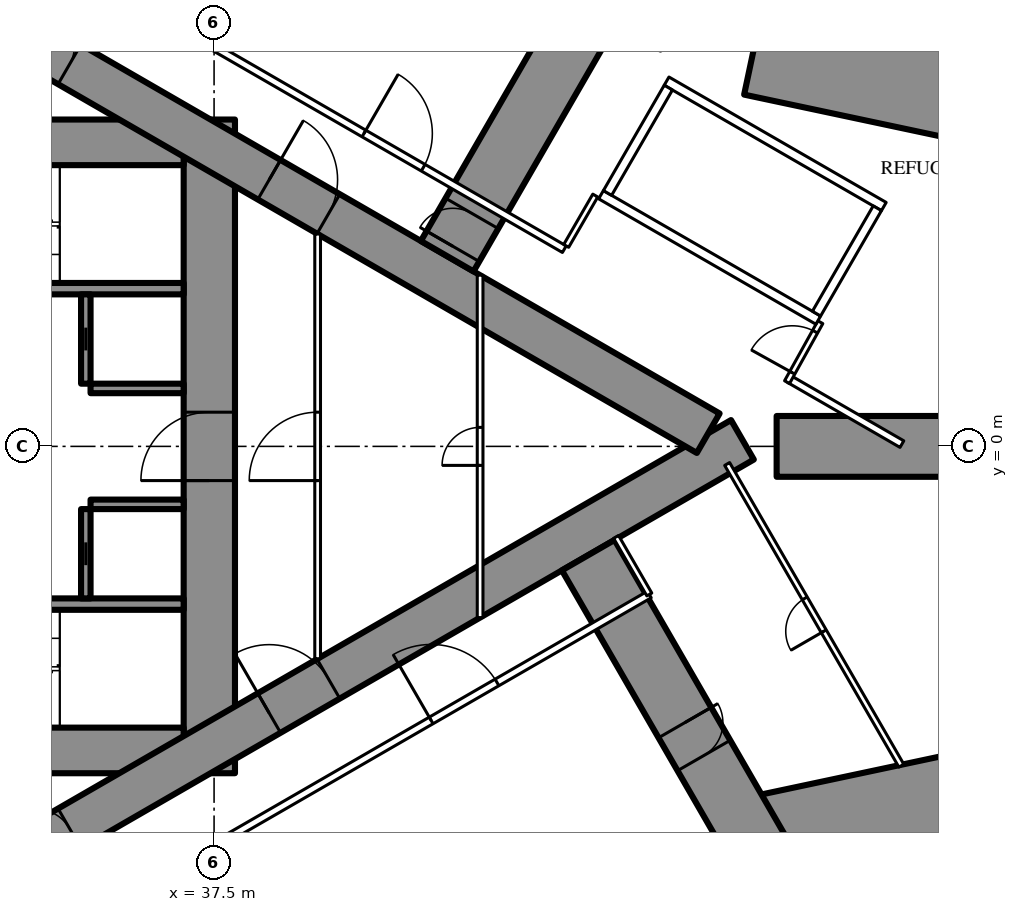
"""IFC4 building model, lengths in metres.
Left out: names, types, materials, properties, quantities, classifications, styles, units other than length and angle.
Written with IfcOpenShell. Run it as: python <this file> out.ifc"""

import sys

from ifc_helpers import new_model, si_unit, direction, frame, frame_2d, origin, place, context, subcontext, project, spatial, rectangle, extrude, element, fill, save


model = new_model("IFC4")
c1 = context("Model", 3, precision=1e-05, world=origin(), true_north=direction((0.0, 1.0)))
c2 = subcontext(c1, "Body", "Model", "MODEL_VIEW")
j1 = project(units=[si_unit("LENGTHUNIT", "METRE"), si_unit("PLANEANGLEUNIT", "RADIAN")], contexts=[c1])
p1 = place(None, origin())
s1 = spatial("IfcSite", under=j1, at=p1, CompositionType="ELEMENT")
p2 = place(p1, origin())
s2 = spatial("IfcBuilding", under=s1, at=p2, CompositionType="ELEMENT")
p3 = place(p2, frame((0.0, 0.0, 205.3)))
s3 = spatial("IfcBuildingStorey", under=s2, at=p3, CompositionType="ELEMENT", Elevation=205.3)
for number, where, z_axis, x_axis in (
    (1, (57.59, 9.381, 0.0), (0.0, 0.0, 1.0), (-0.978, 0.208, 0.0)),
    (2, (57.59, -9.381, 0.0), (0.0, 0.0, 1.0), (-0.978, -0.208, 0.0)),
):
    element("IfcWall", number, at=place(p3, frame(where, z_axis=z_axis, x_axis=x_axis)), inside=s3, PredefinedType="SHEAR", context=c2, shape_type="SweptSolid", body=[
        extrude(rectangle(XDim=5.983, YDim=2.8, at=frame_2d((2.991, 0.0))), origin(), (0.0, 0.0, 1.0), 5.0),
    ])
p4 = place(p3, frame((37.375, -8.6, 0.0), z_axis=(0.0, 0.0, 1.0), x_axis=(0.0, 1.0, 0.0)))
e3 = element("IfcWall", 3, at=p4, inside=s3, PredefinedType="SHEAR", context=c2, shape_type="SweptSolid", body=[
    extrude(rectangle(XDim=17.2, YDim=1.35, at=frame_2d((8.6, 0.0))), origin(), (0.0, 0.0, 1.0), 5.0),
])
p5 = place(p4, frame((7.7, 0.0, 0.0)))
e4 = element("IfcOpeningElement", 4, at=p5, cuts=e3, PredefinedType="OPENING", context=c2, shape_type="SweptSolid", body=[
    extrude(rectangle(XDim=1.8, YDim=2.2, at=frame_2d((0.9, 1.1))), frame((0.0, 0.685, 0.0), z_axis=(0.0, -1.0, 0.0), x_axis=(1.0, 0.0, 0.0)), (0.0, 0.0, 1.0), 1.37),
])
p6 = place(p3, frame((28.3, -8.0, 0.0), z_axis=(0.0, 0.0, 1.0), x_axis=(1.0, 0.0, 0.0)))
e5 = element("IfcWall", 5, at=p6, inside=s3, PredefinedType="SHEAR", context=c2, shape_type="SweptSolid", body=[
    extrude(rectangle(XDim=8.4, YDim=1.2, at=frame_2d((4.2, 0.0))), origin(), (0.0, 0.0, 1.0), 5.0),
])
p7 = place(p6, frame((0.25, 0.0, 0.0)))
e6 = element("IfcOpeningElement", 6, at=p7, cuts=e5, PredefinedType="OPENING", context=c2, shape_type="SweptSolid", body=[
    extrude(rectangle(XDim=1.0, YDim=2.2, at=frame_2d((0.5, 1.1))), frame((0.0, 0.61, 0.0), z_axis=(0.0, -1.0, 0.0), x_axis=(1.0, 0.0, 0.0)), (0.0, 0.0, 1.0), 1.22),
])
p8 = place(p3, frame((28.3, 8.0, 0.0), z_axis=(0.0, 0.0, 1.0), x_axis=(1.0, 0.0, 0.0)))
e7 = element("IfcWall", 7, at=p8, inside=s3, PredefinedType="SHEAR", context=c2, shape_type="SweptSolid", body=[
    extrude(rectangle(XDim=8.4, YDim=1.2, at=frame_2d((4.2, 0.0))), origin(), (0.0, 0.0, 1.0), 5.0),
])
p9 = place(p8, frame((0.25, 0.0, 0.0)))
e8 = element("IfcOpeningElement", 8, at=p9, cuts=e7, PredefinedType="OPENING", context=c2, shape_type="SweptSolid", body=[
    extrude(rectangle(XDim=1.0, YDim=2.2, at=frame_2d((0.5, 1.1))), frame((0.0, 0.61, 0.0), z_axis=(0.0, -1.0, 0.0), x_axis=(1.0, 0.0, 0.0)), (0.0, 0.0, 1.0), 1.22),
])
for number, where, z_axis, x_axis in (
    (9, (28.3, -4.15, 0.0), (0.0, 0.0, 1.0), (1.0, 0.0, 0.0)),
    (10, (28.3, 4.15, 0.0), (0.0, 0.0, 1.0), (1.0, 0.0, 0.0)),
):
    element("IfcWall", number, at=place(p3, frame(where, z_axis=z_axis, x_axis=x_axis)), inside=s3, PredefinedType="SHEAR", context=c2, shape_type="SweptSolid", body=[
        extrude(rectangle(XDim=8.4, YDim=0.3, at=frame_2d((4.2, 0.0))), origin(), (0.0, 0.0, 1.0), 5.0),
    ])
p10 = place(p3, frame((34.125, -4.0, 0.0), z_axis=(0.0, 0.0, 1.0), x_axis=(0.0, 1.0, 0.0)))
e11 = element("IfcWall", 11, at=p10, inside=s3, PredefinedType="SHEAR", context=c2, shape_type="SweptSolid", body=[
    extrude(rectangle(XDim=2.35, YDim=0.25, at=frame_2d((1.175, 0.0))), origin(), (0.0, 0.0, 1.0), 5.0),
])
p11 = place(p10, frame((0.875, 0.0, 0.0)))
e12 = element("IfcOpeningElement", 12, at=p11, cuts=e11, PredefinedType="OPENING", context=c2, shape_type="SweptSolid", body=[
    extrude(rectangle(XDim=0.6, YDim=2.0, at=frame_2d((0.3, 1.0))), frame((0.0, 0.135, 0.0), z_axis=(0.0, -1.0, 0.0), x_axis=(1.0, 0.0, 0.0)), (0.0, 0.0, 1.0), 0.27),
])
p12 = place(p3, frame((34.25, -1.525, 0.0), z_axis=(0.0, 0.0, 1.0), x_axis=(1.0, 0.0, 0.0)))
e13 = element("IfcWall", 13, at=p12, inside=s3, PredefinedType="SHEAR", context=c2, shape_type="SweptSolid", body=[
    extrude(rectangle(XDim=2.45, YDim=0.25, at=frame_2d((1.225, 0.0))), origin(), (0.0, 0.0, 1.0), 5.0),
])
p13 = place(p3, frame((34.125, 1.65, 0.0), z_axis=(0.0, 0.0, 1.0), x_axis=(0.0, 1.0, 0.0)))
e14 = element("IfcWall", 14, at=p13, inside=s3, PredefinedType="SHEAR", context=c2, shape_type="SweptSolid", body=[
    extrude(rectangle(XDim=2.35, YDim=0.25, at=frame_2d((1.175, 0.0))), origin(), (0.0, 0.0, 1.0), 5.0),
])
p14 = place(p13, frame((0.875, 0.0, 0.0)))
e15 = element("IfcOpeningElement", 15, at=p14, cuts=e14, PredefinedType="OPENING", context=c2, shape_type="SweptSolid", body=[
    extrude(rectangle(XDim=0.6, YDim=2.0, at=frame_2d((0.3, 1.0))), frame((0.0, 0.135, 0.0), z_axis=(0.0, -1.0, 0.0), x_axis=(1.0, 0.0, 0.0)), (0.0, 0.0, 1.0), 0.27),
])
p15 = place(p3, frame((34.25, 1.525, 0.0), z_axis=(0.0, 0.0, 1.0), x_axis=(1.0, 0.0, 0.0)))
e16 = element("IfcWall", 16, at=p15, inside=s3, PredefinedType="SHEAR", context=c2, shape_type="SweptSolid", body=[
    extrude(rectangle(XDim=2.45, YDim=0.25, at=frame_2d((1.225, 0.0))), origin(), (0.0, 0.0, 1.0), 5.0),
])
p16 = place(p3, frame((27.2, -13.8, 0.0), z_axis=(0.0, 0.0, 1.0), x_axis=(0.866027159892, 0.499996958321, 0.0)))
e17 = element("IfcWall", 17, at=p16, inside=s3, PredefinedType="SHEAR", context=c2, shape_type="SweptSolid", body=[
    extrude(rectangle(XDim=27.947, YDim=1.2, at=frame_2d((13.973, 0.0))), origin(), (0.0, 0.0, 1.0), 5.0),
])
p17 = place(p16, frame((6.5, 0.0, 0.0)))
e18 = element("IfcOpeningElement", 18, at=p17, cuts=e17, PredefinedType="OPENING", context=c2, shape_type="SweptSolid", body=[
    extrude(rectangle(XDim=1.0, YDim=2.2, at=frame_2d((0.5, 1.1))), frame((0.0, 0.61, 0.0), z_axis=(0.0, -1.0, 0.0), x_axis=(1.0, 0.0, 0.0)), (0.0, 0.0, 1.0), 1.22),
])
p18 = place(p16, frame((13.568, 0.0, 0.0)))
e19 = element("IfcOpeningElement", 19, at=p18, cuts=e17, PredefinedType="OPENING", context=c2, shape_type="SweptSolid", body=[
    extrude(rectangle(XDim=1.8, YDim=2.2, at=frame_2d((0.9, 1.1))), frame((0.0, 0.61, 0.0), z_axis=(0.0, -1.0, 0.0), x_axis=(1.0, 0.0, 0.0)), (0.0, 0.0, 1.0), 1.22),
])
p19 = place(p3, frame((27.2, 13.8, 0.0), z_axis=(0.0, 0.0, 1.0), x_axis=(0.866024515034, -0.500001539357, 0.0)))
e20 = element("IfcWall", 20, at=p19, inside=s3, PredefinedType="SHEAR", context=c2, shape_type="SweptSolid", body=[
    extrude(rectangle(XDim=26.907, YDim=1.2, at=frame_2d((13.454, 0.0))), origin(), (0.0, 0.0, 1.0), 5.0),
])
p20 = place(p19, frame((6.5, 0.0, 0.0)))
e21 = element("IfcOpeningElement", 21, at=p20, cuts=e20, PredefinedType="OPENING", context=c2, shape_type="SweptSolid", body=[
    extrude(rectangle(XDim=1.0, YDim=2.2, at=frame_2d((0.5, 1.1))), frame((0.0, 0.61, 0.0), z_axis=(0.0, -1.0, 0.0), x_axis=(1.0, 0.0, 0.0)), (0.0, 0.0, 1.0), 1.22),
])
p21 = place(p19, frame((13.568, 0.0, 0.0)))
e22 = element("IfcOpeningElement", 22, at=p21, cuts=e20, PredefinedType="OPENING", context=c2, shape_type="SweptSolid", body=[
    extrude(rectangle(XDim=1.8, YDim=2.2, at=frame_2d((0.9, 1.1))), frame((0.0, 0.61, 0.0), z_axis=(0.0, -1.0, 0.0), x_axis=(1.0, 0.0, 0.0)), (0.0, 0.0, 1.0), 1.22),
])
p22 = place(p3, frame((47.345, -2.862, 0.0), z_axis=(0.0, 0.0, 1.0), x_axis=(0.500012973899, -0.866017913171, 0.0)))
e23 = element("IfcWall", 23, at=p22, inside=s3, PredefinedType="SHEAR", context=c2, shape_type="SweptSolid", body=[
    extrude(rectangle(XDim=10.499, YDim=1.6, at=frame_2d((5.25, 0.0))), origin(), (0.0, 0.0, 1.0), 5.0),
])
p23 = place(p22, frame((5.087, 0.0, 0.0)))
e24 = element("IfcOpeningElement", 24, at=p23, cuts=e23, PredefinedType="OPENING", context=c2, shape_type="SweptSolid", body=[
    extrude(rectangle(XDim=1.0, YDim=2.2, at=frame_2d((0.5, 1.1))), frame((0.0, 0.81, 0.0), z_axis=(0.0, -1.0, 0.0), x_axis=(1.0, 0.0, 0.0)), (0.0, 0.0, 1.0), 1.62),
])
p24 = place(p3, frame((52.302, 0.0, 0.0), z_axis=(0.0, 0.0, 1.0), x_axis=(1.0, 0.0, 0.0)))
e25 = element("IfcWall", 25, at=p24, inside=s3, PredefinedType="SHEAR", context=c2, shape_type="SweptSolid", body=[
    extrude(rectangle(XDim=10.239, YDim=1.6, at=frame_2d((5.12, 0.0))), origin(), (0.0, 0.0, 1.0), 5.0),
])
p25 = place(p3, frame((43.634, 5.004, 0.0), z_axis=(0.0, 0.0, 1.0), x_axis=(0.499995493849, 0.866028005396, 0.0)))
e26 = element("IfcWall", 26, at=p25, inside=s3, PredefinedType="SHEAR", context=c2, shape_type="SweptSolid", body=[
    extrude(rectangle(XDim=10.526, YDim=1.6, at=frame_2d((5.263, 0.0))), origin(), (0.0, 0.0, 1.0), 5.0),
])
p26 = place(p25, frame((0.3, 0.0, 0.0)))
e27 = element("IfcOpeningElement", 27, at=p26, cuts=e26, PredefinedType="OPENING", context=c2, shape_type="SweptSolid", body=[
    extrude(rectangle(XDim=1.0, YDim=2.2, at=frame_2d((0.5, 1.1))), frame((0.0, 0.81, 0.0), z_axis=(0.0, -1.0, 0.0), x_axis=(1.0, 0.0, 0.0)), (0.0, 0.0, 1.0), 1.62),
])
p27 = place(p3, frame((55.583, -8.401, 0.0), z_axis=(0.0, 0.0, 1.0), x_axis=(-0.499997575924, 0.866026803321, 0.0)))
e28 = element("IfcWall", 28, at=p27, inside=s3, PredefinedType="PARTITIONING", context=c2, shape_type="SweptSolid", body=[
    extrude(rectangle(XDim=9.167, YDim=0.15, at=frame_2d((4.583, 0.0))), origin(), (0.0, 0.0, 1.0), 4.75),
])
p28 = place(p27, frame((4.083, 0.0, 0.0)))
e29 = element("IfcOpeningElement", 29, at=p28, cuts=e28, PredefinedType="OPENING", context=c2, shape_type="SweptSolid", body=[
    extrude(rectangle(XDim=1.0, YDim=2.2, at=frame_2d((0.5, 1.1))), frame((0.0, 0.085, 0.0), z_axis=(0.0, -1.0, 0.0), x_axis=(1.0, 0.0, 0.0)), (0.0, 0.0, 1.0), 0.17),
])
p29 = place(p3, frame((27.959, 16.017, 0.0), z_axis=(0.0, 0.0, 1.0), x_axis=(0.866027146794, -0.499996981007, 0.0)))
e30 = element("IfcWall", 30, at=p29, inside=s3, PredefinedType="PARTITIONING", context=c2, shape_type="SweptSolid", body=[
    extrude(rectangle(XDim=21.657, YDim=0.2, at=frame_2d((10.829, 0.0))), origin(), (0.0, 0.0, 1.0), 4.75),
])
p30 = place(p29, frame((15.57, 0.0, 0.0)))
e31 = element("IfcOpeningElement", 31, at=p30, cuts=e30, PredefinedType="OPENING", context=c2, shape_type="SweptSolid", body=[
    extrude(rectangle(XDim=1.8, YDim=2.2, at=frame_2d((0.9, 1.1))), frame((0.0, 0.11, 0.0), z_axis=(0.0, -1.0, 0.0), x_axis=(1.0, 0.0, 0.0)), (0.0, 0.0, 1.0), 0.22),
])
p31 = place(p29, frame((6.579, 0.0, 0.0)))
e32 = element("IfcOpeningElement", 32, at=p31, cuts=e30, PredefinedType="OPENING", context=c2, shape_type="SweptSolid", body=[
    extrude(rectangle(XDim=1.8, YDim=2.2, at=frame_2d((0.9, 1.1))), frame((0.0, 0.11, 0.0), z_axis=(0.0, -1.0, 0.0), x_axis=(1.0, 0.0, 0.0)), (0.0, 0.0, 1.0), 0.22),
])
p32 = place(p3, frame((52.639, 1.769, 0.0), z_axis=(0.0, 0.0, 1.0), x_axis=(0.866027340901, -0.4999966448, 0.0)))
e33 = element("IfcWall", 33, at=p32, inside=s3, PredefinedType="PARTITIONING", context=c2, shape_type="SweptSolid", body=[
    extrude(rectangle(XDim=3.417, YDim=0.2, at=frame_2d((1.708, 0.0))), origin(), (0.0, 0.0, 1.0), 4.75),
])
p33 = place(p3, frame((52.576, 1.689, 0.0), z_axis=(0.0, 0.0, 1.0), x_axis=(0.485482130951, 0.874246590229, 0.0)))
e34 = element("IfcWall", 34, at=p33, inside=s3, PredefinedType="PARTITIONING", context=c2, shape_type="SweptSolid", body=[
    extrude(rectangle(XDim=1.805, YDim=0.15, at=frame_2d((0.902, 0.0))), origin(), (0.0, 0.0, 1.0), 4.75),
])
p34 = place(p33, frame((0.285, 0.0, 0.0)))
e35 = element("IfcOpeningElement", 35, at=p34, cuts=e34, PredefinedType="OPENING", context=c2, shape_type="SweptSolid", body=[
    extrude(rectangle(XDim=1.235, YDim=2.2, at=frame_2d((0.618, 1.1))), frame((0.0, 0.085, 0.0), z_axis=(0.0, -1.0, 0.0), x_axis=(1.0, 0.0, 0.0)), (0.0, 0.0, 1.0), 0.17),
])
p35 = place(p3, frame((46.765, 5.275, 0.0), z_axis=(0.0, 0.0, 1.0), x_axis=(0.499915892944, 0.866073957571, 0.0)))
e36 = element("IfcWall", 36, at=p35, inside=s3, PredefinedType="PARTITIONING", context=c2, shape_type="SweptSolid", body=[
    extrude(rectangle(XDim=1.53, YDim=0.15, at=frame_2d((0.765, 0.0))), origin(), (0.0, 0.0, 1.0), 4.75),
])
p36 = place(p3, frame((27.959, -16.017, 0.0), z_axis=(0.0, 0.0, 1.0), x_axis=(0.866026253963, 0.499998527445, 0.0)))
e37 = element("IfcWall", 37, at=p36, inside=s3, PredefinedType="PARTITIONING", context=c2, shape_type="SweptSolid", body=[
    extrude(rectangle(XDim=24.241, YDim=0.2, at=frame_2d((12.12, 0.0))), origin(), (0.0, 0.0, 1.0), 4.75),
])
p37 = place(p36, frame((6.579, 0.0, 0.0)))
e38 = element("IfcOpeningElement", 38, at=p37, cuts=e37, PredefinedType="OPENING", context=c2, shape_type="SweptSolid", body=[
    extrude(rectangle(XDim=1.8, YDim=2.2, at=frame_2d((0.9, 1.1))), frame((0.0, 0.11, 0.0), z_axis=(0.0, -1.0, 0.0), x_axis=(1.0, 0.0, 0.0)), (0.0, 0.0, 1.0), 0.22),
])
p38 = place(p36, frame((17.612, 0.0, 0.0)))
e39 = element("IfcOpeningElement", 39, at=p38, cuts=e37, PredefinedType="OPENING", context=c2, shape_type="SweptSolid", body=[
    extrude(rectangle(XDim=2.0, YDim=2.4, at=frame_2d((1.0, 1.2))), frame((0.0, 0.11, 0.0), z_axis=(0.0, -1.0, 0.0), x_axis=(1.0, 0.0, 0.0)), (0.0, 0.0, 1.0), 0.22),
])
p39 = place(p3, frame((48.953, -3.897, 0.0), z_axis=(0.0, 0.0, 1.0), x_axis=(-0.499980071345, 0.866036909293, 0.0)))
e40 = element("IfcWall", 40, at=p39, inside=s3, PredefinedType="PARTITIONING", context=c2, shape_type="SweptSolid", body=[
    extrude(rectangle(XDim=1.75, YDim=0.15, at=frame_2d((0.875, 0.0))), origin(), (0.0, 0.0, 1.0), 4.75),
])
p40 = place(p3, frame((40.225, -5.587, 0.0), z_axis=(0.0, 0.0, 1.0), x_axis=(0.0, 1.0, 0.0)))
e41 = element("IfcWall", 41, at=p40, inside=s3, PredefinedType="PARTITIONING", context=c2, shape_type="SweptSolid", body=[
    extrude(rectangle(XDim=11.174, YDim=0.15, at=frame_2d((5.587, 0.0))), origin(), (0.0, 0.0, 1.0), 4.75),
])
p41 = place(p40, frame((4.687, 0.0, 0.0)))
e42 = element("IfcOpeningElement", 42, at=p41, cuts=e41, PredefinedType="OPENING", context=c2, shape_type="SweptSolid", body=[
    extrude(rectangle(XDim=1.8, YDim=2.2, at=frame_2d((0.9, 1.1))), frame((0.0, 0.085, 0.0), z_axis=(0.0, -1.0, 0.0), x_axis=(1.0, 0.0, 0.0)), (0.0, 0.0, 1.0), 0.17),
])
p42 = place(p3, frame((44.5, -4.505, 0.0), z_axis=(0.0, 0.0, 1.0), x_axis=(0.0, 1.0, 0.0)))
e43 = element("IfcWall", 43, at=p42, inside=s3, PredefinedType="PARTITIONING", context=c2, shape_type="SweptSolid", body=[
    extrude(rectangle(XDim=9.009, YDim=0.15, at=frame_2d((4.505, 0.0))), origin(), (0.0, 0.0, 1.0), 4.75),
])
p43 = place(p42, frame((4.005, 0.0, 0.0)))
e44 = element("IfcOpeningElement", 44, at=p43, cuts=e43, PredefinedType="OPENING", context=c2, shape_type="SweptSolid", body=[
    extrude(rectangle(XDim=1.0, YDim=2.2, at=frame_2d((0.5, 1.1))), frame((0.0, 0.085, 0.0), z_axis=(0.0, -1.0, 0.0), x_axis=(1.0, 0.0, 0.0)), (0.0, 0.0, 1.0), 0.17),
])
for number, where, z_axis, x_axis in (
    (45, (47.681, 6.622, 0.0), (0.0, 0.0, 1.0), (0.866, -0.5, 0.0)),
    (46, (49.406, 9.611, 0.0), (0.0, 0.0, 1.0), (0.866, -0.5, 0.0)),
):
    element("IfcWall", number, at=place(p3, frame(where, z_axis=z_axis, x_axis=x_axis)), inside=s3, PredefinedType="PARTITIONING", context=c2, shape_type="SweptSolid", body=[
        extrude(rectangle(XDim=6.6, YDim=0.25, at=frame_2d((3.3, 0.0))), origin(), (0.0, 0.0, 1.0), 4.75),
    ])
p44 = place(p3, frame((47.852, 6.668, 0.0), z_axis=(0.0, 0.0, 1.0), x_axis=(0.499929347863, 0.866066190972, 0.0)))
e47 = element("IfcWall", 47, at=p44, inside=s3, PredefinedType="PARTITIONING", context=c2, shape_type="SweptSolid", body=[
    extrude(rectangle(XDim=3.201, YDim=0.25, at=frame_2d((1.6, 0.0))), origin(), (0.0, 0.0, 1.0), 4.75),
])
p45 = place(p3, frame((53.352, 3.493, 0.0), z_axis=(0.0, 0.0, 1.0), x_axis=(0.499872130319, 0.866099216793, 0.0)))
e48 = element("IfcWall", 48, at=p45, inside=s3, PredefinedType="PARTITIONING", context=c2, shape_type="SweptSolid", body=[
    extrude(rectangle(XDim=3.2, YDim=0.25, at=frame_2d((1.6, 0.0))), origin(), (0.0, 0.0, 1.0), 4.75),
])
p46 = place(p26, origin())
e49 = element("IfcDoor", 49, at=p46, inside=s3, OperationType="SINGLE_SWING_LEFT", PredefinedType="DOOR", context=c2, shape_type="SweptSolid", body=[
    extrude(rectangle(XDim=1.0, YDim=2.2, at=frame_2d((0.5, 1.1))), frame((0.0, 0.025, 0.0), z_axis=(0.0, -1.0, 0.0), x_axis=(1.0, 0.0, 0.0)), (0.0, 0.0, 1.0), 0.05),
])
fill(e27, e49)
p47 = place(p38, origin())
e50 = element("IfcDoor", 50, at=p47, inside=s3, OperationType="DOUBLE_DOOR_SINGLE_SWING", PredefinedType="DOOR", context=c2, shape_type="SweptSolid", body=[
    extrude(rectangle(XDim=2.0, YDim=2.4, at=frame_2d((1.0, 1.2))), frame((0.0, 0.025, 0.0), z_axis=(0.0, -1.0, 0.0), x_axis=(1.0, 0.0, 0.0)), (0.0, 0.0, 1.0), 0.05),
])
fill(e39, e50)
p48 = place(p30, origin())
e51 = element("IfcDoor", 51, at=p48, inside=s3, OperationType="DOUBLE_DOOR_SINGLE_SWING", PredefinedType="DOOR", context=c2, shape_type="SweptSolid", body=[
    extrude(rectangle(XDim=1.8, YDim=2.2, at=frame_2d((0.9, 1.1))), frame((0.0, 0.025, 0.0), z_axis=(0.0, -1.0, 0.0), x_axis=(1.0, 0.0, 0.0)), (0.0, 0.0, 1.0), 0.05),
])
fill(e31, e51)
p49 = place(p34, origin())
e52 = element("IfcDoor", 52, at=p49, inside=s3, OperationType="SINGLE_SWING_LEFT", PredefinedType="DOOR", context=c2, shape_type="SweptSolid", body=[
    extrude(rectangle(XDim=1.235, YDim=2.2, at=frame_2d((0.618, 1.1))), frame((0.0, 0.025, 0.0), z_axis=(0.0, -1.0, 0.0), x_axis=(1.0, 0.0, 0.0)), (0.0, 0.0, 1.0), 0.05),
])
fill(e35, e52)
p50 = place(p23, origin())
e53 = element("IfcDoor", 53, at=p50, inside=s3, OperationType="SINGLE_SWING_LEFT", PredefinedType="DOOR", context=c2, shape_type="SweptSolid", body=[
    extrude(rectangle(XDim=1.0, YDim=2.2, at=frame_2d((0.5, 1.1))), frame((0.0, 0.025, 0.0), z_axis=(0.0, -1.0, 0.0), x_axis=(1.0, 0.0, 0.0)), (0.0, 0.0, 1.0), 0.05),
])
fill(e24, e53)
p51 = place(p28, origin())
e54 = element("IfcDoor", 54, at=p51, inside=s3, OperationType="SINGLE_SWING_LEFT", PredefinedType="DOOR", context=c2, shape_type="SweptSolid", body=[
    extrude(rectangle(XDim=1.0, YDim=2.2, at=frame_2d((0.5, 1.1))), frame((0.0, 0.025, 0.0), z_axis=(0.0, -1.0, 0.0), x_axis=(1.0, 0.0, 0.0)), (0.0, 0.0, 1.0), 0.05),
])
fill(e29, e54)
p52 = place(p41, origin())
e55 = element("IfcDoor", 55, at=p52, inside=s3, OperationType="DOUBLE_DOOR_SINGLE_SWING", PredefinedType="DOOR", context=c2, shape_type="SweptSolid", body=[
    extrude(rectangle(XDim=1.8, YDim=2.2, at=frame_2d((0.9, 1.1))), frame((0.0, 0.025, 0.0), z_axis=(0.0, -1.0, 0.0), x_axis=(1.0, 0.0, 0.0)), (0.0, 0.0, 1.0), 0.05),
])
fill(e42, e55)
p53 = place(p43, origin())
e56 = element("IfcDoor", 56, at=p53, inside=s3, OperationType="SINGLE_SWING_LEFT", PredefinedType="DOOR", context=c2, shape_type="SweptSolid", body=[
    extrude(rectangle(XDim=1.0, YDim=2.2, at=frame_2d((0.5, 1.1))), frame((0.0, 0.025, 0.0), z_axis=(0.0, -1.0, 0.0), x_axis=(1.0, 0.0, 0.0)), (0.0, 0.0, 1.0), 0.05),
])
fill(e44, e56)
p54 = place(p17, origin())
e57 = element("IfcDoor", 57, at=p54, inside=s3, OperationType="SINGLE_SWING_LEFT", PredefinedType="DOOR", context=c2, shape_type="SweptSolid", body=[
    extrude(rectangle(XDim=1.0, YDim=2.2, at=frame_2d((0.5, 1.1))), frame((0.0, 0.025, 0.0), z_axis=(0.0, -1.0, 0.0), x_axis=(1.0, 0.0, 0.0)), (0.0, 0.0, 1.0), 0.05),
])
fill(e18, e57)
p55 = place(p18, origin())
e58 = element("IfcDoor", 58, at=p55, inside=s3, OperationType="DOUBLE_DOOR_SINGLE_SWING", PredefinedType="DOOR", context=c2, shape_type="SweptSolid", body=[
    extrude(rectangle(XDim=1.8, YDim=2.2, at=frame_2d((0.9, 1.1))), frame((0.0, 0.025, 0.0), z_axis=(0.0, -1.0, 0.0), x_axis=(1.0, 0.0, 0.0)), (0.0, 0.0, 1.0), 0.05),
])
fill(e19, e58)
p56 = place(p20, origin())
e59 = element("IfcDoor", 59, at=p56, inside=s3, OperationType="SINGLE_SWING_LEFT", PredefinedType="DOOR", context=c2, shape_type="SweptSolid", body=[
    extrude(rectangle(XDim=1.0, YDim=2.2, at=frame_2d((0.5, 1.1))), frame((0.0, 0.025, 0.0), z_axis=(0.0, -1.0, 0.0), x_axis=(1.0, 0.0, 0.0)), (0.0, 0.0, 1.0), 0.05),
])
fill(e21, e59)
p57 = place(p21, origin())
e60 = element("IfcDoor", 60, at=p57, inside=s3, OperationType="DOUBLE_DOOR_SINGLE_SWING", PredefinedType="DOOR", context=c2, shape_type="SweptSolid", body=[
    extrude(rectangle(XDim=1.8, YDim=2.2, at=frame_2d((0.9, 1.1))), frame((0.0, 0.025, 0.0), z_axis=(0.0, -1.0, 0.0), x_axis=(1.0, 0.0, 0.0)), (0.0, 0.0, 1.0), 0.05),
])
fill(e22, e60)
p58 = place(p5, origin())
e61 = element("IfcDoor", 61, at=p58, inside=s3, OperationType="DOUBLE_DOOR_SINGLE_SWING", PredefinedType="DOOR", context=c2, shape_type="SweptSolid", body=[
    extrude(rectangle(XDim=1.8, YDim=2.2, at=frame_2d((0.9, 1.1))), frame((0.0, 0.025, 0.0), z_axis=(0.0, -1.0, 0.0), x_axis=(1.0, 0.0, 0.0)), (0.0, 0.0, 1.0), 0.05),
])
fill(e4, e61)
p59 = place(p11, origin())
e62 = element("IfcDoor", 62, at=p59, inside=s3, OperationType="SLIDING_TO_LEFT", PredefinedType="DOOR", context=c2, shape_type="SweptSolid", body=[
    extrude(rectangle(XDim=0.6, YDim=2.0, at=frame_2d((0.3, 1.0))), frame((0.0, 0.025, 0.0), z_axis=(0.0, -1.0, 0.0), x_axis=(1.0, 0.0, 0.0)), (0.0, 0.0, 1.0), 0.05),
])
fill(e12, e62)
p60 = place(p14, origin())
e63 = element("IfcDoor", 63, at=p60, inside=s3, OperationType="SLIDING_TO_LEFT", PredefinedType="DOOR", context=c2, shape_type="SweptSolid", body=[
    extrude(rectangle(XDim=0.6, YDim=2.0, at=frame_2d((0.3, 1.0))), frame((0.0, 0.025, 0.0), z_axis=(0.0, -1.0, 0.0), x_axis=(1.0, 0.0, 0.0)), (0.0, 0.0, 1.0), 0.05),
])
fill(e15, e63)
save(model, sys.argv[1])
